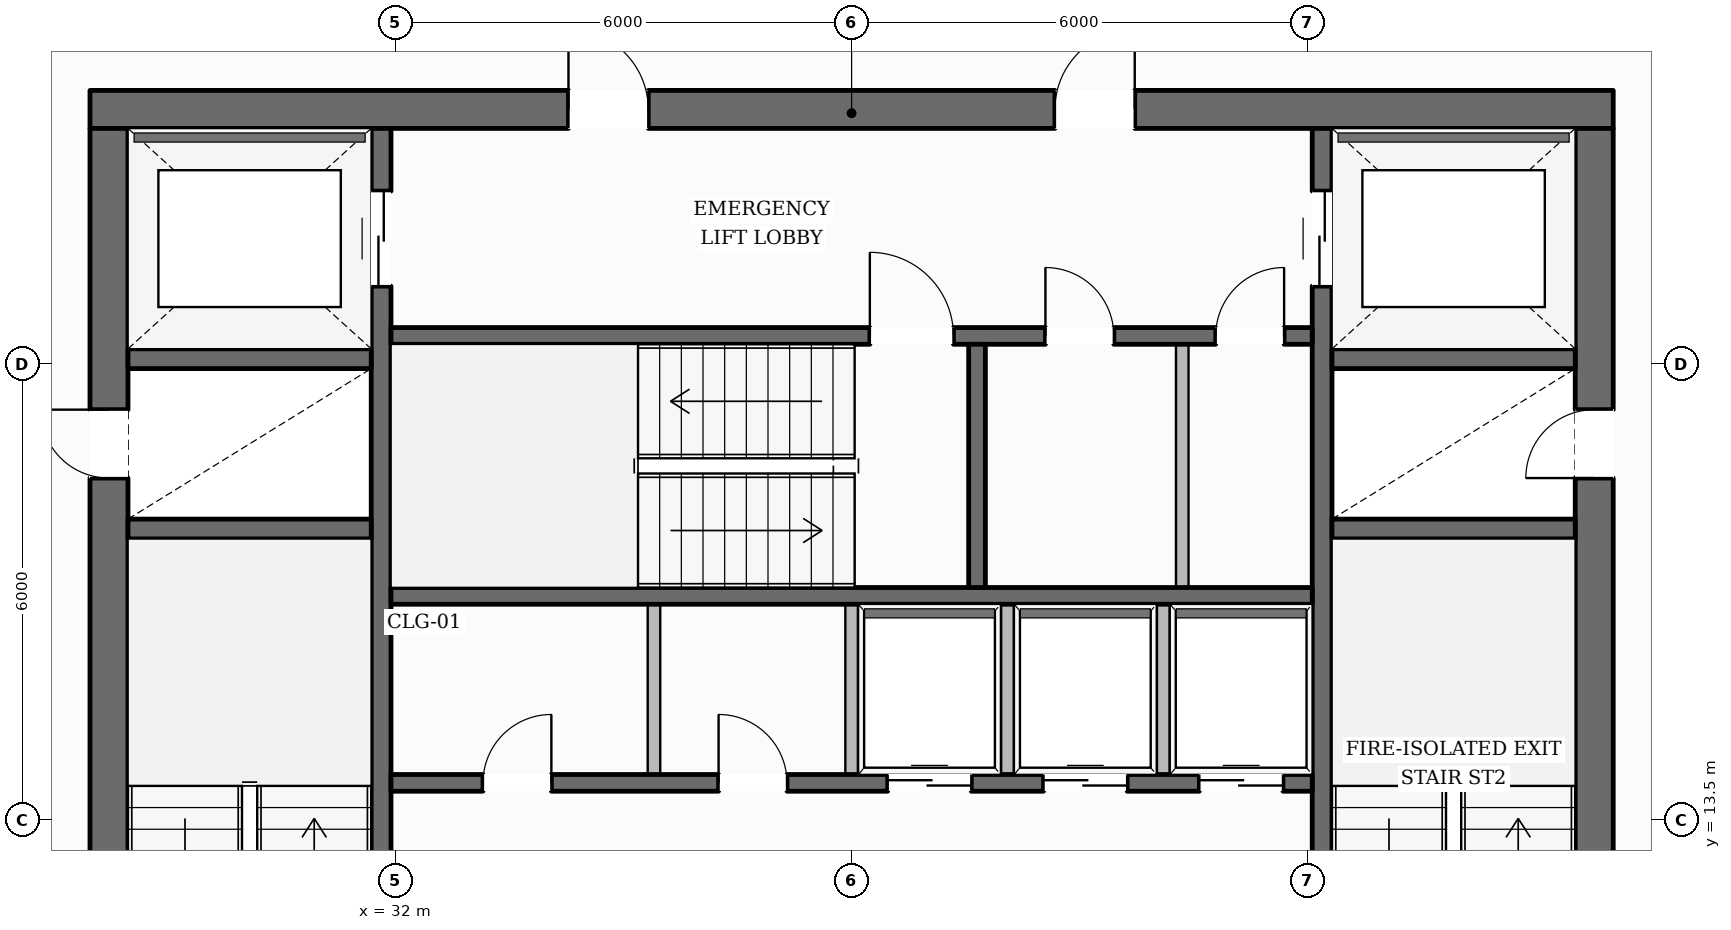
"""IFC4 building model, lengths in metres.
Left out: names, types, materials, properties, quantities, classifications, styles, units other than length and angle.
Written with IfcOpenShell. Run it as: python <this file> out.ifc"""

import sys

from ifc_helpers import new_model, si_unit, direction, frame, frame_2d, origin, place, context, subcontext, project, spatial, rectangle, extrude, element, fill, save


model = new_model("IFC4")
c1 = context("Model", 3, precision=1e-05, world=origin(), true_north=direction((0.0, 1.0)))
c2 = subcontext(c1, "Body", "Model", "MODEL_VIEW")
j1 = project(units=[si_unit("LENGTHUNIT", "METRE"), si_unit("PLANEANGLEUNIT", "RADIAN")], contexts=[c1])
p1 = place(None, origin())
s1 = spatial("IfcSite", under=j1, at=p1, CompositionType="ELEMENT")
p2 = place(p1, origin())
s2 = spatial("IfcBuilding", under=s1, at=p2, CompositionType="ELEMENT")
p3 = place(p2, frame((0.0, 0.0, 93.2)))
s3 = spatial("IfcBuildingStorey", under=s2, at=p3, CompositionType="ELEMENT", Elevation=93.2)
p4 = place(p3, frame((27.98, 22.85, 0.0), z_axis=(0.0, 0.0, 1.0), x_axis=(1.0, 0.0, 0.0)))
e1 = element("IfcWall", 1, at=p4, inside=s3, PredefinedType="SOLIDWALL", context=c2, shape_type="SweptSolid", body=[
    extrude(rectangle(XDim=20.04, YDim=0.5, at=frame_2d((10.02, 0.0))), origin(), (0.0, 0.0, 1.0), 3.6),
])
p5 = place(p4, frame((6.295, 0.0, 0.0)))
e2 = element("IfcOpeningElement", 2, at=p5, cuts=e1, PredefinedType="OPENING", context=c2, shape_type="SweptSolid", body=[
    extrude(rectangle(XDim=1.05, YDim=2.15, at=frame_2d((0.525, 1.075))), frame((0.0, 0.26, 0.0), z_axis=(0.0, -1.0, 0.0), x_axis=(1.0, 0.0, 0.0)), (0.0, 0.0, 1.0), 0.52),
])
p6 = place(p4, frame((12.695, 0.0, 0.0)))
e3 = element("IfcOpeningElement", 3, at=p6, cuts=e1, PredefinedType="OPENING", context=c2, shape_type="SweptSolid", body=[
    extrude(rectangle(XDim=1.05, YDim=2.15, at=frame_2d((0.525, 1.075))), frame((0.0, 0.26, 0.0), z_axis=(0.0, -1.0, 0.0), x_axis=(1.0, 0.0, 0.0)), (0.0, 0.0, 1.0), 0.52),
])
p7 = place(p3, frame((28.23, 9.6, 0.0), z_axis=(0.0, 0.0, 1.0), x_axis=(0.0, 1.0, 0.0)))
e4 = element("IfcWall", 4, at=p7, inside=s3, PredefinedType="SOLIDWALL", context=c2, shape_type="SweptSolid", body=[
    extrude(rectangle(XDim=13.0, YDim=0.5, at=frame_2d((6.5, 0.0))), origin(), (0.0, 0.0, 1.0), 3.6),
])
p8 = place(p7, frame((0.2, 0.0, 0.0)))
e5 = element("IfcOpeningElement", 5, at=p8, cuts=e4, PredefinedType="OPENING", context=c2, shape_type="SweptSolid", body=[
    extrude(rectangle(XDim=1.1, YDim=2.15, at=frame_2d((0.55, 1.075))), frame((0.0, 0.26, 0.0), z_axis=(0.0, -1.0, 0.0), x_axis=(1.0, 0.0, 0.0)), (0.0, 0.0, 1.0), 0.52),
])
p9 = place(p7, frame((8.4, 0.0, 0.0)))
e6 = element("IfcOpeningElement", 6, at=p9, cuts=e4, PredefinedType="OPENING", context=c2, shape_type="SweptSolid", body=[
    extrude(rectangle(XDim=0.9, YDim=2.1, at=frame_2d((0.45, 1.05))), frame((0.0, 0.26, 0.0), z_axis=(0.0, -1.0, 0.0), x_axis=(1.0, 0.0, 0.0)), (0.0, 0.0, 1.0), 0.52),
])
p10 = place(p3, frame((47.77, 9.6, 0.0), z_axis=(0.0, 0.0, 1.0), x_axis=(0.0, 1.0, 0.0)))
e7 = element("IfcWall", 7, at=p10, inside=s3, PredefinedType="SOLIDWALL", context=c2, shape_type="SweptSolid", body=[
    extrude(rectangle(XDim=13.0, YDim=0.5, at=frame_2d((6.5, 0.0))), origin(), (0.0, 0.0, 1.0), 3.6),
])
p11 = place(p10, frame((0.2, 0.0, 0.0)))
e8 = element("IfcOpeningElement", 8, at=p11, cuts=e7, PredefinedType="OPENING", context=c2, shape_type="SweptSolid", body=[
    extrude(rectangle(XDim=1.1, YDim=2.15, at=frame_2d((0.55, 1.075))), frame((0.0, 0.26, 0.0), z_axis=(0.0, -1.0, 0.0), x_axis=(1.0, 0.0, 0.0)), (0.0, 0.0, 1.0), 0.52),
])
p12 = place(p10, frame((8.4, 0.0, 0.0)))
e9 = element("IfcOpeningElement", 9, at=p12, cuts=e7, PredefinedType="OPENING", context=c2, shape_type="SweptSolid", body=[
    extrude(rectangle(XDim=0.9, YDim=2.1, at=frame_2d((0.45, 1.05))), frame((0.0, 0.26, 0.0), z_axis=(0.0, -1.0, 0.0), x_axis=(1.0, 0.0, 0.0)), (0.0, 0.0, 1.0), 0.52),
])
p13 = place(p3, frame((31.81, 9.6, 0.0), z_axis=(0.0, 0.0, 1.0), x_axis=(0.0, 1.0, 0.0)))
e10 = element("IfcWall", 10, at=p13, inside=s3, PredefinedType="SHEAR", context=c2, shape_type="SweptSolid", body=[
    extrude(rectangle(XDim=13.0, YDim=0.26, at=frame_2d((6.5, 0.0))), origin(), (0.0, 0.0, 1.0), 3.6),
])
p14 = place(p13, frame((10.925, 0.0, 0.0)))
e11 = element("IfcOpeningElement", 11, at=p14, cuts=e10, PredefinedType="OPENING", context=c2, shape_type="SweptSolid", body=[
    extrude(rectangle(XDim=1.25, YDim=2.25, at=frame_2d((0.625, 1.125))), frame((0.0, 0.14, 0.0), z_axis=(0.0, -1.0, 0.0), x_axis=(1.0, 0.0, 0.0)), (0.0, 0.0, 1.0), 0.28),
])
p15 = place(p3, frame((44.19, 9.6, 0.0), z_axis=(0.0, 0.0, 1.0), x_axis=(0.0, 1.0, 0.0)))
e12 = element("IfcWall", 12, at=p15, inside=s3, PredefinedType="SHEAR", context=c2, shape_type="SweptSolid", body=[
    extrude(rectangle(XDim=13.0, YDim=0.26, at=frame_2d((6.5, 0.0))), origin(), (0.0, 0.0, 1.0), 3.6),
])
p16 = place(p15, frame((10.925, 0.0, 0.0)))
e13 = element("IfcOpeningElement", 13, at=p16, cuts=e12, PredefinedType="OPENING", context=c2, shape_type="SweptSolid", body=[
    extrude(rectangle(XDim=1.25, YDim=2.25, at=frame_2d((0.625, 1.125))), frame((0.0, 0.14, 0.0), z_axis=(0.0, -1.0, 0.0), x_axis=(1.0, 0.0, 0.0)), (0.0, 0.0, 1.0), 0.28),
])
for number, where, z_axis, x_axis in (
    (14, (28.48, 17.33, 0.0), (0.0, 0.0, 1.0), (1.0, 0.0, 0.0)),
    (15, (28.48, 19.57, 0.0), (0.0, 0.0, 1.0), (1.0, 0.0, 0.0)),
    (16, (44.32, 17.33, 0.0), (0.0, 0.0, 1.0), (1.0, 0.0, 0.0)),
    (17, (44.32, 19.57, 0.0), (0.0, 0.0, 1.0), (1.0, 0.0, 0.0)),
):
    element("IfcWall", number, at=place(p3, frame(where, z_axis=z_axis, x_axis=x_axis)), inside=s3, PredefinedType="SHEAR", context=c2, shape_type="SweptSolid", body=[
        extrude(rectangle(XDim=3.2, YDim=0.26, at=frame_2d((1.6, 0.0))), origin(), (0.0, 0.0, 1.0), 3.6),
    ])
p17 = place(p3, frame((31.94, 19.87, 0.0), z_axis=(0.0, 0.0, 1.0), x_axis=(1.0, 0.0, 0.0)))
e18 = element("IfcWall", 18, at=p17, inside=s3, PredefinedType="SOLIDWALL", context=c2, shape_type="SweptSolid", body=[
    extrude(rectangle(XDim=12.12, YDim=0.22, at=frame_2d((6.06, 0.0))), origin(), (0.0, 0.0, 1.0), 3.6),
])
p18 = place(p17, frame((6.3, 0.0, 0.0)))
e19 = element("IfcOpeningElement", 19, at=p18, cuts=e18, PredefinedType="OPENING", context=c2, shape_type="SweptSolid", body=[
    extrude(rectangle(XDim=1.1, YDim=2.15, at=frame_2d((0.55, 1.075))), frame((0.0, 0.12, 0.0), z_axis=(0.0, -1.0, 0.0), x_axis=(1.0, 0.0, 0.0)), (0.0, 0.0, 1.0), 0.24),
])
p19 = place(p17, frame((8.61, 0.0, 0.0)))
e20 = element("IfcOpeningElement", 20, at=p19, cuts=e18, PredefinedType="OPENING", context=c2, shape_type="SweptSolid", body=[
    extrude(rectangle(XDim=0.9, YDim=2.1, at=frame_2d((0.45, 1.05))), frame((0.0, 0.12, 0.0), z_axis=(0.0, -1.0, 0.0), x_axis=(1.0, 0.0, 0.0)), (0.0, 0.0, 1.0), 0.24),
])
p20 = place(p17, frame((10.85, 0.0, 0.0)))
e21 = element("IfcOpeningElement", 21, at=p20, cuts=e18, PredefinedType="OPENING", context=c2, shape_type="SweptSolid", body=[
    extrude(rectangle(XDim=0.9, YDim=2.1, at=frame_2d((0.45, 1.05))), frame((0.0, 0.12, 0.0), z_axis=(0.0, -1.0, 0.0), x_axis=(1.0, 0.0, 0.0)), (0.0, 0.0, 1.0), 0.24),
])
p21 = place(p3, frame((31.94, 16.45, 0.0), z_axis=(0.0, 0.0, 1.0), x_axis=(1.0, 0.0, 0.0)))
e22 = element("IfcWall", 22, at=p21, inside=s3, PredefinedType="SOLIDWALL", context=c2, shape_type="SweptSolid", body=[
    extrude(rectangle(XDim=12.12, YDim=0.22, at=frame_2d((6.06, 0.0))), origin(), (0.0, 0.0, 1.0), 3.6),
])
p22 = place(p3, frame((39.65, 16.56, 0.0), z_axis=(0.0, 0.0, 1.0), x_axis=(0.0, 1.0, 0.0)))
e23 = element("IfcWall", 23, at=p22, inside=s3, PredefinedType="SOLIDWALL", context=c2, shape_type="SweptSolid", body=[
    extrude(rectangle(XDim=3.2, YDim=0.22, at=frame_2d((1.6, 0.0))), origin(), (0.0, 0.0, 1.0), 3.6),
])
p23 = place(p3, frame((31.94, 13.99, 0.0), z_axis=(0.0, 0.0, 1.0), x_axis=(1.0, 0.0, 0.0)))
e24 = element("IfcWall", 24, at=p23, inside=s3, PredefinedType="SOLIDWALL", context=c2, shape_type="SweptSolid", body=[
    extrude(rectangle(XDim=12.12, YDim=0.22, at=frame_2d((6.06, 0.0))), origin(), (0.0, 0.0, 1.0), 3.6),
])
p24 = place(p23, frame((1.21, 0.0, 0.0)))
e25 = element("IfcOpeningElement", 25, at=p24, cuts=e24, PredefinedType="OPENING", context=c2, shape_type="SweptSolid", body=[
    extrude(rectangle(XDim=0.9, YDim=2.1, at=frame_2d((0.45, 1.05))), frame((0.0, 0.12, 0.0), z_axis=(0.0, -1.0, 0.0), x_axis=(1.0, 0.0, 0.0)), (0.0, 0.0, 1.0), 0.24),
])
p25 = place(p23, frame((4.31, 0.0, 0.0)))
e26 = element("IfcOpeningElement", 26, at=p25, cuts=e24, PredefinedType="OPENING", context=c2, shape_type="SweptSolid", body=[
    extrude(rectangle(XDim=0.9, YDim=2.1, at=frame_2d((0.45, 1.05))), frame((0.0, 0.12, 0.0), z_axis=(0.0, -1.0, 0.0), x_axis=(1.0, 0.0, 0.0)), (0.0, 0.0, 1.0), 0.24),
])
p26 = place(p23, frame((6.535, 0.0, 0.0)))
e27 = element("IfcOpeningElement", 27, at=p26, cuts=e24, PredefinedType="OPENING", context=c2, shape_type="SweptSolid", body=[
    extrude(rectangle(XDim=1.1, YDim=2.2, at=frame_2d((0.55, 1.1))), frame((0.0, 0.12, 0.0), z_axis=(0.0, -1.0, 0.0), x_axis=(1.0, 0.0, 0.0)), (0.0, 0.0, 1.0), 0.24),
])
p27 = place(p23, frame((8.585, 0.0, 0.0)))
e28 = element("IfcOpeningElement", 28, at=p27, cuts=e24, PredefinedType="OPENING", context=c2, shape_type="SweptSolid", body=[
    extrude(rectangle(XDim=1.1, YDim=2.2, at=frame_2d((0.55, 1.1))), frame((0.0, 0.12, 0.0), z_axis=(0.0, -1.0, 0.0), x_axis=(1.0, 0.0, 0.0)), (0.0, 0.0, 1.0), 0.24),
])
p28 = place(p23, frame((10.635, 0.0, 0.0)))
e29 = element("IfcOpeningElement", 29, at=p28, cuts=e24, PredefinedType="OPENING", context=c2, shape_type="SweptSolid", body=[
    extrude(rectangle(XDim=1.1, YDim=2.2, at=frame_2d((0.55, 1.1))), frame((0.0, 0.12, 0.0), z_axis=(0.0, -1.0, 0.0), x_axis=(1.0, 0.0, 0.0)), (0.0, 0.0, 1.0), 0.24),
])
p29 = place(p3, frame((14.031, 13.485, 0.0), z_axis=(0.0, 0.0, 1.0), x_axis=(0.494642620698, 0.869096472084, 0.0)))
e30 = element("IfcWall", 30, at=p29, inside=s3, PredefinedType="STANDARD", context=c2, shape_type="SweptSolid", body=[
    extrude(rectangle(XDim=35.916, YDim=0.38, at=frame_2d((17.958, 0.0))), origin(), (0.0, 0.0, 1.0), 3.059),
])
p30 = place(p29, frame((31.748, 0.0, 0.65)))
e31 = element("IfcOpeningElement", 31, at=p30, cuts=e30, PredefinedType="OPENING", context=c2, shape_type="SweptSolid", body=[
    extrude(rectangle(XDim=1.55, YDim=1.75, at=frame_2d((0.775, 0.875))), frame((0.0, 0.2, 0.0), z_axis=(0.0, -1.0, 0.0), x_axis=(1.0, 0.0, 0.0)), (0.0, 0.0, 1.0), 0.4),
])
p31 = place(p29, frame((25.921, 0.0, 0.65)))
e32 = element("IfcOpeningElement", 32, at=p31, cuts=e30, PredefinedType="OPENING", context=c2, shape_type="SweptSolid", body=[
    extrude(rectangle(XDim=1.55, YDim=1.75, at=frame_2d((0.775, 0.875))), frame((0.0, 0.2, 0.0), z_axis=(0.0, -1.0, 0.0), x_axis=(1.0, 0.0, 0.0)), (0.0, 0.0, 1.0), 0.4),
])
p32 = place(p29, frame((8.439, 0.0, 0.65)))
e33 = element("IfcOpeningElement", 33, at=p32, cuts=e30, PredefinedType="OPENING", context=c2, shape_type="SweptSolid", body=[
    extrude(rectangle(XDim=1.55, YDim=1.75, at=frame_2d((0.775, 0.875))), frame((0.0, 0.2, 0.0), z_axis=(0.0, -1.0, 0.0), x_axis=(1.0, 0.0, 0.0)), (0.0, 0.0, 1.0), 0.4),
])
p33 = place(p29, frame((2.612, 0.0, 0.65)))
e34 = element("IfcOpeningElement", 34, at=p33, cuts=e30, PredefinedType="OPENING", context=c2, shape_type="SweptSolid", body=[
    extrude(rectangle(XDim=1.55, YDim=1.75, at=frame_2d((0.775, 0.875))), frame((0.0, 0.2, 0.0), z_axis=(0.0, -1.0, 0.0), x_axis=(1.0, 0.0, 0.0)), (0.0, 0.0, 1.0), 0.4),
])
p34 = place(p3, frame((44.203, 44.699, 0.0), z_axis=(0.0, 0.0, 1.0), x_axis=(0.494642620698, -0.869096472084, 0.0)))
e35 = element("IfcWall", 35, at=p34, inside=s3, PredefinedType="STANDARD", context=c2, shape_type="SweptSolid", body=[
    extrude(rectangle(XDim=35.916, YDim=0.38, at=frame_2d((17.958, 0.0))), origin(), (0.0, 0.0, 1.0), 3.059),
])
p35 = place(p34, frame((31.754, 0.0, 0.65)))
e36 = element("IfcOpeningElement", 36, at=p35, cuts=e35, PredefinedType="OPENING", context=c2, shape_type="SweptSolid", body=[
    extrude(rectangle(XDim=1.55, YDim=1.75, at=frame_2d((0.775, 0.875))), frame((0.0, 0.2, 0.0), z_axis=(0.0, -1.0, 0.0), x_axis=(1.0, 0.0, 0.0)), (0.0, 0.0, 1.0), 0.4),
])
p36 = place(p34, frame((25.927, 0.0, 0.65)))
e37 = element("IfcOpeningElement", 37, at=p36, cuts=e35, PredefinedType="OPENING", context=c2, shape_type="SweptSolid", body=[
    extrude(rectangle(XDim=1.55, YDim=1.75, at=frame_2d((0.775, 0.875))), frame((0.0, 0.2, 0.0), z_axis=(0.0, -1.0, 0.0), x_axis=(1.0, 0.0, 0.0)), (0.0, 0.0, 1.0), 0.4),
])
p37 = place(p34, frame((14.272, 0.0, 0.65)))
e38 = element("IfcOpeningElement", 38, at=p37, cuts=e35, PredefinedType="OPENING", context=c2, shape_type="SweptSolid", body=[
    extrude(rectangle(XDim=1.55, YDim=1.75, at=frame_2d((0.775, 0.875))), frame((0.0, 0.2, 0.0), z_axis=(0.0, -1.0, 0.0), x_axis=(1.0, 0.0, 0.0)), (0.0, 0.0, 1.0), 0.4),
])
p38 = place(p34, frame((8.445, 0.0, 0.65)))
e39 = element("IfcOpeningElement", 39, at=p38, cuts=e35, PredefinedType="OPENING", context=c2, shape_type="SweptSolid", body=[
    extrude(rectangle(XDim=1.55, YDim=1.75, at=frame_2d((0.775, 0.875))), frame((0.0, 0.2, 0.0), z_axis=(0.0, -1.0, 0.0), x_axis=(1.0, 0.0, 0.0)), (0.0, 0.0, 1.0), 0.4),
])
p39 = place(p34, frame((2.618, 0.0, 0.65)))
e40 = element("IfcOpeningElement", 40, at=p39, cuts=e35, PredefinedType="OPENING", context=c2, shape_type="SweptSolid", body=[
    extrude(rectangle(XDim=1.55, YDim=1.75, at=frame_2d((0.775, 0.875))), frame((0.0, 0.2, 0.0), z_axis=(0.0, -1.0, 0.0), x_axis=(1.0, 0.0, 0.0)), (0.0, 0.0, 1.0), 0.4),
])
for number, where, z_axis, x_axis in (
    (41, (38.0, 14.1, 0.0), (0.0, 0.0, 1.0), (0.0, 1.0, 0.0)),
    (42, (35.4, 14.1, 0.0), (0.0, 0.0, 1.0), (0.0, 1.0, 0.0)),
    (43, (40.05, 14.1, 0.0), (0.0, 0.0, 1.0), (0.0, 1.0, 0.0)),
    (44, (42.1, 14.1, 0.0), (0.0, 0.0, 1.0), (0.0, 1.0, 0.0)),
):
    element("IfcWall", number, at=place(p3, frame(where, z_axis=z_axis, x_axis=x_axis)), inside=s3, PredefinedType="PARTITIONING", context=c2, shape_type="SweptSolid", body=[
        extrude(rectangle(XDim=2.24, YDim=0.165, at=frame_2d((1.12, 0.0))), origin(), (0.0, 0.0, 1.0), 3.6),
    ])
p40 = place(p3, frame((42.35, 16.56, 0.0), z_axis=(0.0, 0.0, 1.0), x_axis=(0.0, 1.0, 0.0)))
e45 = element("IfcWall", 45, at=p40, inside=s3, PredefinedType="PARTITIONING", context=c2, shape_type="SweptSolid", body=[
    extrude(rectangle(XDim=3.2, YDim=0.165, at=frame_2d((1.6, 0.0))), origin(), (0.0, 0.0, 1.0), 3.6),
])
p41 = place(p18, origin())
e46 = element("IfcDoor", 46, at=p41, inside=s3, OperationType="SINGLE_SWING_LEFT", PredefinedType="DOOR", context=c2, shape_type="SweptSolid", body=[
    extrude(rectangle(XDim=1.1, YDim=2.15, at=frame_2d((0.55, 1.075))), frame((0.0, 0.025, 0.0), z_axis=(0.0, -1.0, 0.0), x_axis=(1.0, 0.0, 0.0)), (0.0, 0.0, 1.0), 0.05),
])
fill(e19, e46)
p42 = place(p9, origin())
e47 = element("IfcDoor", 47, at=p42, inside=s3, OperationType="SINGLE_SWING_RIGHT", PredefinedType="DOOR", context=c2, shape_type="SweptSolid", body=[
    extrude(rectangle(XDim=0.9, YDim=2.1, at=frame_2d((0.45, 1.05))), frame((0.0, 0.025, 0.0), z_axis=(0.0, -1.0, 0.0), x_axis=(1.0, 0.0, 0.0)), (0.0, 0.0, 1.0), 0.05),
])
fill(e6, e47)
p43 = place(p12, origin())
e48 = element("IfcDoor", 48, at=p43, inside=s3, OperationType="SINGLE_SWING_LEFT", PredefinedType="DOOR", context=c2, shape_type="SweptSolid", body=[
    extrude(rectangle(XDim=0.9, YDim=2.1, at=frame_2d((0.45, 1.05))), frame((0.0, 0.025, 0.0), z_axis=(0.0, -1.0, 0.0), x_axis=(1.0, 0.0, 0.0)), (0.0, 0.0, 1.0), 0.05),
])
fill(e9, e48)
p44 = place(p5, origin())
e49 = element("IfcDoor", 49, at=p44, inside=s3, OperationType="SINGLE_SWING_LEFT", PredefinedType="DOOR", context=c2, shape_type="SweptSolid", body=[
    extrude(rectangle(XDim=1.05, YDim=2.15, at=frame_2d((0.525, 1.075))), frame((0.0, 0.025, 0.0), z_axis=(0.0, -1.0, 0.0), x_axis=(1.0, 0.0, 0.0)), (0.0, 0.0, 1.0), 0.05),
])
fill(e2, e49)
p45 = place(p6, origin())
e50 = element("IfcDoor", 50, at=p45, inside=s3, OperationType="SINGLE_SWING_RIGHT", PredefinedType="DOOR", context=c2, shape_type="SweptSolid", body=[
    extrude(rectangle(XDim=1.05, YDim=2.15, at=frame_2d((0.525, 1.075))), frame((0.0, 0.025, 0.0), z_axis=(0.0, -1.0, 0.0), x_axis=(1.0, 0.0, 0.0)), (0.0, 0.0, 1.0), 0.05),
])
fill(e3, e50)
p46 = place(p14, origin())
e51 = element("IfcDoor", 51, at=p46, inside=s3, OperationType="DOUBLE_DOOR_SLIDING", PredefinedType="DOOR", context=c2, shape_type="SweptSolid", body=[
    extrude(rectangle(XDim=1.25, YDim=2.25, at=frame_2d((0.625, 1.125))), frame((0.0, 0.025, 0.0), z_axis=(0.0, -1.0, 0.0), x_axis=(1.0, 0.0, 0.0)), (0.0, 0.0, 1.0), 0.05),
])
fill(e11, e51)
p47 = place(p16, origin())
e52 = element("IfcDoor", 52, at=p47, inside=s3, OperationType="DOUBLE_DOOR_SLIDING", PredefinedType="DOOR", context=c2, shape_type="SweptSolid", body=[
    extrude(rectangle(XDim=1.25, YDim=2.25, at=frame_2d((0.625, 1.125))), frame((0.0, 0.025, 0.0), z_axis=(0.0, -1.0, 0.0), x_axis=(1.0, 0.0, 0.0)), (0.0, 0.0, 1.0), 0.05),
])
fill(e13, e52)
p48 = place(p24, origin())
e53 = element("IfcDoor", 53, at=p48, inside=s3, OperationType="SINGLE_SWING_RIGHT", PredefinedType="DOOR", context=c2, shape_type="SweptSolid", body=[
    extrude(rectangle(XDim=0.9, YDim=2.1, at=frame_2d((0.45, 1.05))), frame((0.0, 0.025, 0.0), z_axis=(0.0, -1.0, 0.0), x_axis=(1.0, 0.0, 0.0)), (0.0, 0.0, 1.0), 0.05),
])
fill(e25, e53)
p49 = place(p25, origin())
e54 = element("IfcDoor", 54, at=p49, inside=s3, OperationType="SINGLE_SWING_LEFT", PredefinedType="DOOR", context=c2, shape_type="SweptSolid", body=[
    extrude(rectangle(XDim=0.9, YDim=2.1, at=frame_2d((0.45, 1.05))), frame((0.0, 0.025, 0.0), z_axis=(0.0, -1.0, 0.0), x_axis=(1.0, 0.0, 0.0)), (0.0, 0.0, 1.0), 0.05),
])
fill(e26, e54)
p50 = place(p26, origin())
e55 = element("IfcDoor", 55, at=p50, inside=s3, OperationType="DOUBLE_DOOR_SLIDING", PredefinedType="DOOR", context=c2, shape_type="SweptSolid", body=[
    extrude(rectangle(XDim=1.1, YDim=2.2, at=frame_2d((0.55, 1.1))), frame((0.0, 0.025, 0.0), z_axis=(0.0, -1.0, 0.0), x_axis=(1.0, 0.0, 0.0)), (0.0, 0.0, 1.0), 0.05),
])
fill(e27, e55)
p51 = place(p27, origin())
e56 = element("IfcDoor", 56, at=p51, inside=s3, OperationType="DOUBLE_DOOR_SLIDING", PredefinedType="DOOR", context=c2, shape_type="SweptSolid", body=[
    extrude(rectangle(XDim=1.1, YDim=2.2, at=frame_2d((0.55, 1.1))), frame((0.0, 0.025, 0.0), z_axis=(0.0, -1.0, 0.0), x_axis=(1.0, 0.0, 0.0)), (0.0, 0.0, 1.0), 0.05),
])
fill(e28, e56)
p52 = place(p28, origin())
e57 = element("IfcDoor", 57, at=p52, inside=s3, OperationType="DOUBLE_DOOR_SLIDING", PredefinedType="DOOR", context=c2, shape_type="SweptSolid", body=[
    extrude(rectangle(XDim=1.1, YDim=2.2, at=frame_2d((0.55, 1.1))), frame((0.0, 0.025, 0.0), z_axis=(0.0, -1.0, 0.0), x_axis=(1.0, 0.0, 0.0)), (0.0, 0.0, 1.0), 0.05),
])
fill(e29, e57)
p53 = place(p19, origin())
e58 = element("IfcDoor", 58, at=p53, inside=s3, OperationType="SINGLE_SWING_LEFT", PredefinedType="DOOR", context=c2, shape_type="SweptSolid", body=[
    extrude(rectangle(XDim=0.9, YDim=2.1, at=frame_2d((0.45, 1.05))), frame((0.0, 0.025, 0.0), z_axis=(0.0, -1.0, 0.0), x_axis=(1.0, 0.0, 0.0)), (0.0, 0.0, 1.0), 0.05),
])
fill(e20, e58)
p54 = place(p20, origin())
e59 = element("IfcDoor", 59, at=p54, inside=s3, OperationType="SINGLE_SWING_RIGHT", PredefinedType="DOOR", context=c2, shape_type="SweptSolid", body=[
    extrude(rectangle(XDim=0.9, YDim=2.1, at=frame_2d((0.45, 1.05))), frame((0.0, 0.025, 0.0), z_axis=(0.0, -1.0, 0.0), x_axis=(1.0, 0.0, 0.0)), (0.0, 0.0, 1.0), 0.05),
])
fill(e21, e59)
save(model, sys.argv[1])
